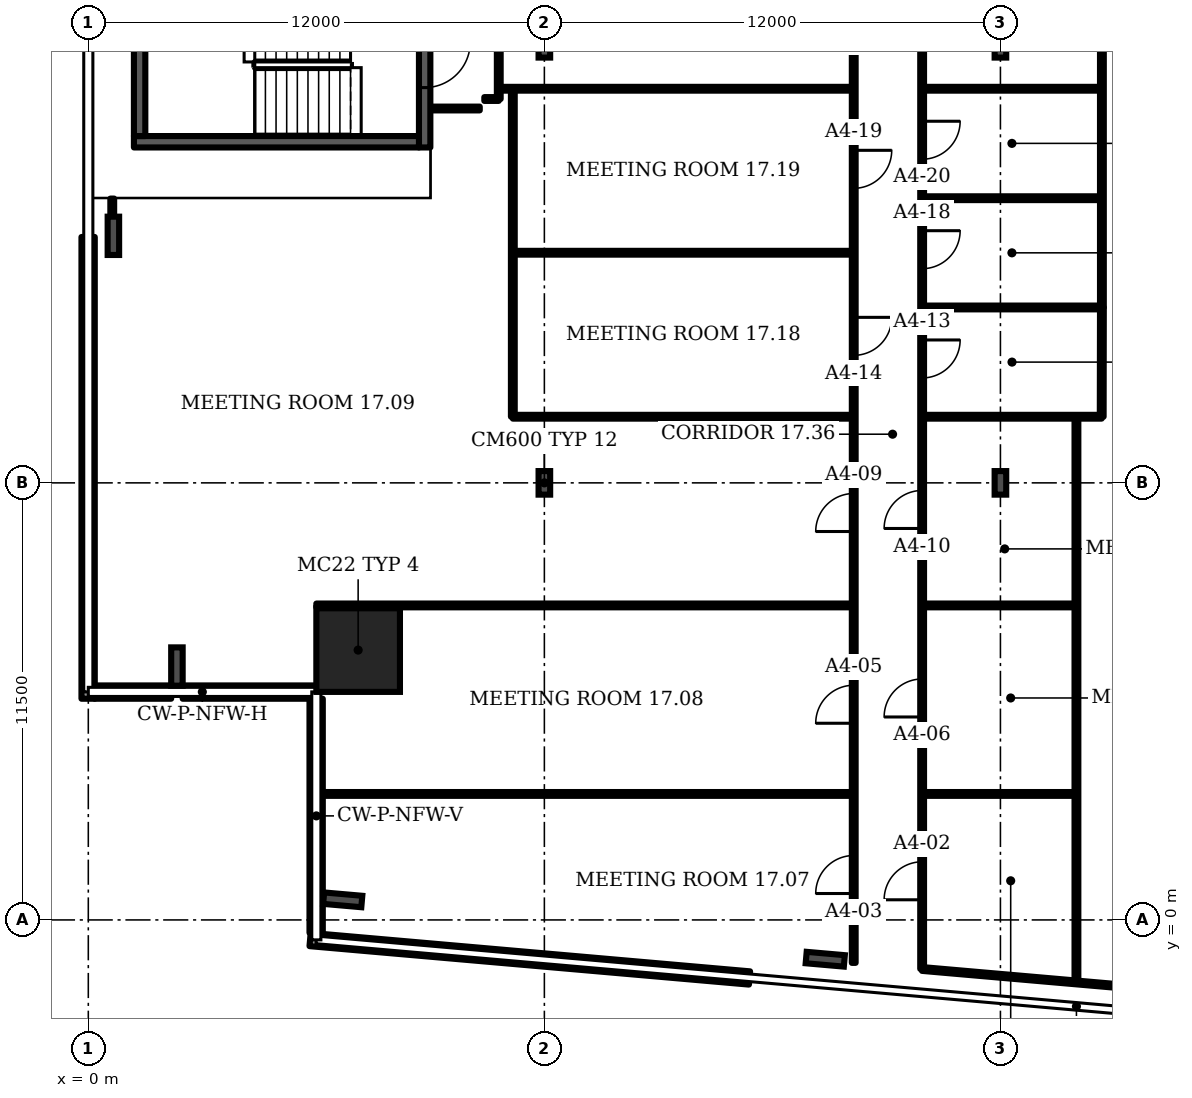
"""IFC4 building model, lengths in metres.
Left out: names, types, materials, properties, quantities, classifications, styles, units other than length and angle.
Written with IfcOpenShell. Run it as: python <this file> out.ifc"""

import sys

from ifc_helpers import new_model, si_unit, direction, frame, frame_2d, origin, origin_2d, place, context, subcontext, project, spatial, rectangle, i_section, extrude, element, fill, save


model = new_model("IFC4")
c1 = context("Model", 3, precision=1e-05, world=origin(), true_north=direction((0.0, 1.0)))
c2 = subcontext(c1, "Body", "Model", "MODEL_VIEW")
j1 = project(units=[si_unit("LENGTHUNIT", "METRE"), si_unit("PLANEANGLEUNIT", "RADIAN")], contexts=[c1])
p1 = place(None, origin())
s1 = spatial("IfcSite", under=j1, at=p1, CompositionType="ELEMENT")
p2 = place(p1, origin())
s2 = spatial("IfcBuilding", under=s1, at=p2, CompositionType="ELEMENT")
p3 = place(p2, frame((0.0, 0.0, 81.1)))
s3 = spatial("IfcBuildingStorey", under=s2, at=p3, CompositionType="ELEMENT", Elevation=81.1)
p4 = place(p3, frame((7.1, 7.1, 0.0), z_axis=(0.0, 0.0, 1.0), x_axis=(1.0, 0.0, 0.0)))
e1 = element("IfcColumn", 1, at=p4, inside=s3, PredefinedType="COLUMN", context=c2, shape_type="SweptSolid", body=[
    extrude(rectangle(XDim=2.2, YDim=2.2, at=origin_2d()), origin(), (0.0, 0.0, 1.0), 3.6),
])
for number, where, z_axis, x_axis in (
    (2, (6.694, 0.529, 0.0), (0.0, 0.0, 1.0), (-0.087, -0.996, 0.0)),
    (3, (19.391, -1.034, 0.0), (0.0, 0.0, 1.0), (-0.087, -0.996, 0.0)),
    (4, (0.66, 18.0, 0.0), (0.0, 0.0, 1.0), (-1.0, 0.0, 0.0)),
    (5, (2.332, 6.667, 0.0), (0.0, 0.0, 1.0), (-1.0, 0.0, 0.0)),
):
    element("IfcColumn", number, at=place(p3, frame(where, z_axis=z_axis, x_axis=x_axis)), inside=s3, PredefinedType="COLUMN", context=c2, shape_type="SweptSolid", body=[
        extrude(i_section(OverallWidth=0.302, OverallDepth=1.008, WebThickness=0.021, FlangeThickness=0.04, FilletRadius=0.03, at=origin_2d()), origin(), (0.0, 0.0, 1.0), 3.6),
    ])
for number, where, z_axis, x_axis in (
    (6, (12.0, 11.5, 0.0), (0.0, 0.0, 1.0), (1.0, 0.0, 0.0)),
    (7, (24.0, 11.5, 0.0), (0.0, 0.0, 1.0), (1.0, 0.0, 0.0)),
    (8, (12.0, 23.0, 0.0), (0.0, 0.0, 1.0), (1.0, 0.0, 0.0)),
    (9, (24.0, 23.0, 0.0), (0.0, 0.0, 1.0), (1.0, 0.0, 0.0)),
):
    element("IfcColumn", number, at=place(p3, frame(where, z_axis=z_axis, x_axis=x_axis)), inside=s3, PredefinedType="COLUMN", context=c2, shape_type="SweptSolid", body=[
        extrude(i_section(OverallWidth=0.305, OverallDepth=0.62, WebThickness=0.021, FlangeThickness=0.04, FilletRadius=0.027, at=origin_2d()), origin(), (0.0, 0.0, 1.0), 3.6),
    ])
p5 = place(p3, frame((5.835, -0.516, 0.0), z_axis=(0.0, 0.0, 1.0), x_axis=(0.996192, -0.087142, 0.0)))
e10 = element("IfcWall", 10, at=p5, inside=s3, PredefinedType="SOLIDWALL", context=c2, shape_type="SweptSolid", body=[
    extrude(rectangle(XDim=11.607, YDim=0.35, at=frame_2d((5.804, 0.0))), origin(), (0.0, 0.0, 1.0), 1.0),
])
p6 = place(p3, frame((-0.005, 17.97, 0.0), z_axis=(0.0, 0.0, 1.0), x_axis=(0.0, -1.0, 0.0)))
e11 = element("IfcWall", 11, at=p6, inside=s3, PredefinedType="SOLIDWALL", context=c2, shape_type="SweptSolid", body=[
    extrude(rectangle(XDim=12.15, YDim=0.35, at=frame_2d((6.075, 0.0))), origin(), (0.0, 0.0, 1.0), 1.0),
])
p7 = place(p3, frame((0.17, 5.995, 0.0), z_axis=(0.0, 0.0, 1.0), x_axis=(1.0, 0.0, 0.0)))
e12 = element("IfcWall", 12, at=p7, inside=s3, PredefinedType="SOLIDWALL", context=c2, shape_type="SweptSolid", body=[
    extrude(rectangle(XDim=2.011, YDim=0.35, at=frame_2d((1.005, 0.0))), origin(), (0.0, 0.0, 1.0), 1.0),
])
p8 = place(p3, frame((2.483, 5.995, 0.0), z_axis=(0.0, 0.0, 1.0), x_axis=(1.0, 0.0, 0.0)))
e13 = element("IfcWall", 13, at=p8, inside=s3, PredefinedType="SOLIDWALL", context=c2, shape_type="SweptSolid", body=[
    extrude(rectangle(XDim=3.517, YDim=0.35, at=frame_2d((1.759, 0.0))), origin(), (0.0, 0.0, 1.0), 1.0),
])
p9 = place(p3, frame((5.995, 5.82, 0.0), z_axis=(0.0, 0.0, 1.0), x_axis=(0.0, -1.0, 0.0)))
e14 = element("IfcWall", 14, at=p9, inside=s3, PredefinedType="SOLIDWALL", context=c2, shape_type="SweptSolid", body=[
    extrude(rectangle(XDim=6.161, YDim=0.35, at=frame_2d((3.081, 0.0))), origin(), (0.0, 0.0, 1.0), 1.0),
])
p10 = place(p3, frame((8.85, 20.325, 0.0), z_axis=(0.0, 0.0, 1.0), x_axis=(0.0, 1.0, 0.0)))
e15 = element("IfcWall", 15, at=p10, inside=s3, PredefinedType="SHEAR", context=c2, shape_type="SweptSolid", body=[
    extrude(rectangle(XDim=4.35, YDim=0.3, at=frame_2d((2.175, 0.0))), origin(), (0.0, 0.0, 1.0), 3.2),
])
p11 = place(p10, frame((1.575, 0.0, 0.0)))
e16 = element("IfcOpeningElement", 16, at=p11, cuts=e15, PredefinedType="OPENING", context=c2, shape_type="SweptSolid", body=[
    extrude(rectangle(XDim=1.2, YDim=2.1, at=frame_2d((0.6, 1.05))), frame((0.0, 0.16, 0.0), z_axis=(0.0, -1.0, 0.0), x_axis=(1.0, 0.0, 0.0)), (0.0, 0.0, 1.0), 0.32),
])
p12 = place(p3, frame((0.63, 17.5, 0.0), z_axis=(0.0, 0.0, 1.0), x_axis=(0.0, 1.0, 0.0)))
e17 = element("IfcWall", 17, at=p12, inside=s3, PredefinedType="PARTITIONING", context=c2, shape_type="SweptSolid", body=[
    extrude(rectangle(XDim=1.48, YDim=0.1, at=frame_2d((0.74, 0.0))), origin(), (0.0, 0.0, 1.0), 2.58),
])
p13 = place(p3, frame((6.0, 8.275, 0.0), z_axis=(0.0, 0.0, 1.0), x_axis=(1.0, 0.0, 0.0)))
e18 = element("IfcWall", 18, at=p13, inside=s3, PredefinedType="PARTITIONING", context=c2, shape_type="SweptSolid", body=[
    extrude(rectangle(XDim=14.14, YDim=0.1, at=frame_2d((7.07, 0.0))), origin(), (0.0, 0.0, 1.0), 3.2),
])
p14 = place(p3, frame((6.02, 3.315, 0.0), z_axis=(0.0, 0.0, 1.0), x_axis=(1.0, 0.0, 0.0)))
e19 = element("IfcWall", 19, at=p14, inside=s3, PredefinedType="PARTITIONING", context=c2, shape_type="SweptSolid", body=[
    extrude(rectangle(XDim=14.12, YDim=0.1, at=frame_2d((7.06, 0.0))), origin(), (0.0, 0.0, 1.0), 3.2),
])
p15 = place(p3, frame((9.02, 21.35, 0.0), z_axis=(0.0, 0.0, 1.0), x_axis=(1.0, 0.0, 0.0)))
e20 = element("IfcWall", 20, at=p15, inside=s3, PredefinedType="PARTITIONING", context=c2, shape_type="SweptSolid", body=[
    extrude(rectangle(XDim=1.28, YDim=0.1, at=frame_2d((0.64, 0.0))), origin(), (0.0, 0.0, 1.0), 3.2),
])
p16 = place(p3, frame((10.42, 21.6, 0.0), z_axis=(0.0, 0.0, 1.0), x_axis=(1.0, 0.0, 0.0)))
e21 = element("IfcWall", 21, at=p16, inside=s3, PredefinedType="PARTITIONING", context=c2, shape_type="SweptSolid", body=[
    extrude(rectangle(XDim=0.38, YDim=0.1, at=frame_2d((0.19, 0.0))), origin(), (0.0, 0.0, 1.0), 3.2),
])
p17 = place(p3, frame((10.8, 21.6, 0.0), z_axis=(0.0, 0.0, 1.0), x_axis=(0.0, 1.0, 0.0)))
e22 = element("IfcWall", 22, at=p17, inside=s3, PredefinedType="PARTITIONING", context=c2, shape_type="SweptSolid", body=[
    extrude(rectangle(XDim=8.9, YDim=0.1, at=frame_2d((4.45, 0.0))), origin(), (0.0, 0.0, 1.0), 3.2),
])
p18 = place(p3, frame((10.8, 21.87, 0.0), z_axis=(0.0, 0.0, 1.0), x_axis=(1.0, 0.0, 0.0)))
e23 = element("IfcWall", 23, at=p18, inside=s3, PredefinedType="PARTITIONING", context=c2, shape_type="SweptSolid", body=[
    extrude(rectangle(XDim=9.34, YDim=0.1, at=frame_2d((4.67, 0.0))), origin(), (0.0, 0.0, 1.0), 3.2),
])
p19 = place(p3, frame((11.17, 13.24, 0.0), z_axis=(0.0, 0.0, 1.0), x_axis=(0.0, 1.0, 0.0)))
e24 = element("IfcWall", 24, at=p19, inside=s3, PredefinedType="PARTITIONING", context=c2, shape_type="SweptSolid", body=[
    extrude(rectangle(XDim=8.63, YDim=0.1, at=frame_2d((4.315, 0.0))), origin(), (0.0, 0.0, 1.0), 3.2),
])
for number, where, z_axis, x_axis in (
    (25, (11.17, 13.24, 0.0), (0.0, 0.0, 1.0), (1.0, 0.0, 0.0)),
    (26, (11.17, 17.555, 0.0), (0.0, 0.0, 1.0), (1.0, 0.0, 0.0)),
):
    element("IfcWall", number, at=place(p3, frame(where, z_axis=z_axis, x_axis=x_axis)), inside=s3, PredefinedType="PARTITIONING", context=c2, shape_type="SweptSolid", body=[
        extrude(rectangle(XDim=8.97, YDim=0.1, at=frame_2d((4.485, 0.0))), origin(), (0.0, 0.0, 1.0), 3.2),
    ])
p20 = place(p3, frame((20.14, -1.13, 0.0), z_axis=(0.0, 0.0, 1.0), x_axis=(0.0, 1.0, 0.0)))
e27 = element("IfcWall", 27, at=p20, inside=s3, PredefinedType="PARTITIONING", context=c2, shape_type="SweptSolid", body=[
    extrude(rectangle(XDim=31.63, YDim=0.1, at=frame_2d((15.815, 0.0))), origin(), (0.0, 0.0, 1.0), 3.2),
])
p21 = place(p20, frame((1.825, 0.0, 0.0)))
e28 = element("IfcOpeningElement", 28, at=p21, cuts=e27, PredefinedType="OPENING", context=c2, shape_type="SweptSolid", body=[
    extrude(rectangle(XDim=1.0, YDim=2.1, at=frame_2d((0.5, 1.05))), frame((0.0, 0.06, 0.0), z_axis=(0.0, -1.0, 0.0), x_axis=(1.0, 0.0, 0.0)), (0.0, 0.0, 1.0), 0.12),
])
p22 = place(p20, frame((6.305, 0.0, 0.0)))
e29 = element("IfcOpeningElement", 29, at=p22, cuts=e27, PredefinedType="OPENING", context=c2, shape_type="SweptSolid", body=[
    extrude(rectangle(XDim=1.0, YDim=2.1, at=frame_2d((0.5, 1.05))), frame((0.0, 0.06, 0.0), z_axis=(0.0, -1.0, 0.0), x_axis=(1.0, 0.0, 0.0)), (0.0, 0.0, 1.0), 0.12),
])
p23 = place(p20, frame((11.35, 0.0, 0.0)))
e30 = element("IfcOpeningElement", 30, at=p23, cuts=e27, PredefinedType="OPENING", context=c2, shape_type="SweptSolid", body=[
    extrude(rectangle(XDim=1.0, YDim=2.1, at=frame_2d((0.5, 1.05))), frame((0.0, 0.06, 0.0), z_axis=(0.0, -1.0, 0.0), x_axis=(1.0, 0.0, 0.0)), (0.0, 0.0, 1.0), 0.12),
])
p24 = place(p20, frame((15.985, 0.0, 0.0)))
e31 = element("IfcOpeningElement", 31, at=p24, cuts=e27, PredefinedType="OPENING", context=c2, shape_type="SweptSolid", body=[
    extrude(rectangle(XDim=1.0, YDim=2.1, at=frame_2d((0.5, 1.05))), frame((0.0, 0.06, 0.0), z_axis=(0.0, -1.0, 0.0), x_axis=(1.0, 0.0, 0.0)), (0.0, 0.0, 1.0), 0.12),
])
p25 = place(p20, frame((20.38, 0.0, 0.0)))
e32 = element("IfcOpeningElement", 32, at=p25, cuts=e27, PredefinedType="OPENING", context=c2, shape_type="SweptSolid", body=[
    extrude(rectangle(XDim=1.0, YDim=2.1, at=frame_2d((0.5, 1.05))), frame((0.0, 0.06, 0.0), z_axis=(0.0, -1.0, 0.0), x_axis=(1.0, 0.0, 0.0)), (0.0, 0.0, 1.0), 0.12),
])
p26 = place(p20, frame((24.695, 0.0, 0.0)))
e33 = element("IfcOpeningElement", 33, at=p26, cuts=e27, PredefinedType="OPENING", context=c2, shape_type="SweptSolid", body=[
    extrude(rectangle(XDim=1.0, YDim=2.1, at=frame_2d((0.5, 1.05))), frame((0.0, 0.06, 0.0), z_axis=(0.0, -1.0, 0.0), x_axis=(1.0, 0.0, 0.0)), (0.0, 0.0, 1.0), 0.12),
])
p27 = place(p3, frame((21.94, -1.29, 0.0), z_axis=(0.0, 0.0, 1.0), x_axis=(0.0, 1.0, 0.0)))
e34 = element("IfcWall", 34, at=p27, inside=s3, PredefinedType="PARTITIONING", context=c2, shape_type="SweptSolid", body=[
    extrude(rectangle(XDim=31.79, YDim=0.1, at=frame_2d((15.895, 0.0))), origin(), (0.0, 0.0, 1.0), 3.2),
])
p28 = place(p27, frame((1.82, 0.0, 0.0)))
e35 = element("IfcOpeningElement", 35, at=p28, cuts=e34, PredefinedType="OPENING", context=c2, shape_type="SweptSolid", body=[
    extrude(rectangle(XDim=1.0, YDim=2.1, at=frame_2d((0.5, 1.05))), frame((0.0, 0.06, 0.0), z_axis=(0.0, -1.0, 0.0), x_axis=(1.0, 0.0, 0.0)), (0.0, 0.0, 1.0), 0.12),
])
p29 = place(p27, frame((6.63, 0.0, 0.0)))
e36 = element("IfcOpeningElement", 36, at=p29, cuts=e34, PredefinedType="OPENING", context=c2, shape_type="SweptSolid", body=[
    extrude(rectangle(XDim=1.0, YDim=2.1, at=frame_2d((0.5, 1.05))), frame((0.0, 0.06, 0.0), z_axis=(0.0, -1.0, 0.0), x_axis=(1.0, 0.0, 0.0)), (0.0, 0.0, 1.0), 0.12),
])
p30 = place(p27, frame((11.59, 0.0, 0.0)))
e37 = element("IfcOpeningElement", 37, at=p30, cuts=e34, PredefinedType="OPENING", context=c2, shape_type="SweptSolid", body=[
    extrude(rectangle(XDim=1.0, YDim=2.1, at=frame_2d((0.5, 1.05))), frame((0.0, 0.06, 0.0), z_axis=(0.0, -1.0, 0.0), x_axis=(1.0, 0.0, 0.0)), (0.0, 0.0, 1.0), 0.12),
])
p31 = place(p27, frame((15.55, 0.0, 0.0)))
e38 = element("IfcOpeningElement", 38, at=p31, cuts=e34, PredefinedType="OPENING", context=c2, shape_type="SweptSolid", body=[
    extrude(rectangle(XDim=1.0, YDim=2.1, at=frame_2d((0.5, 1.05))), frame((0.0, 0.06, 0.0), z_axis=(0.0, -1.0, 0.0), x_axis=(1.0, 0.0, 0.0)), (0.0, 0.0, 1.0), 0.12),
])
p32 = place(p27, frame((18.425, 0.0, 0.0)))
e39 = element("IfcOpeningElement", 39, at=p32, cuts=e34, PredefinedType="OPENING", context=c2, shape_type="SweptSolid", body=[
    extrude(rectangle(XDim=1.0, YDim=2.1, at=frame_2d((0.5, 1.05))), frame((0.0, 0.06, 0.0), z_axis=(0.0, -1.0, 0.0), x_axis=(1.0, 0.0, 0.0)), (0.0, 0.0, 1.0), 0.12),
])
p33 = place(p27, frame((21.305, 0.0, 0.0)))
e40 = element("IfcOpeningElement", 40, at=p33, cuts=e34, PredefinedType="OPENING", context=c2, shape_type="SweptSolid", body=[
    extrude(rectangle(XDim=1.0, YDim=2.1, at=frame_2d((0.5, 1.05))), frame((0.0, 0.06, 0.0), z_axis=(0.0, -1.0, 0.0), x_axis=(1.0, 0.0, 0.0)), (0.0, 0.0, 1.0), 0.12),
])
p34 = place(p27, frame((24.18, 0.0, 0.0)))
e41 = element("IfcOpeningElement", 41, at=p34, cuts=e34, PredefinedType="OPENING", context=c2, shape_type="SweptSolid", body=[
    extrude(rectangle(XDim=1.0, YDim=2.1, at=frame_2d((0.5, 1.05))), frame((0.0, 0.06, 0.0), z_axis=(0.0, -1.0, 0.0), x_axis=(1.0, 0.0, 0.0)), (0.0, 0.0, 1.0), 0.12),
])
p35 = place(p27, frame((27.055, 0.0, 0.0)))
e42 = element("IfcOpeningElement", 42, at=p35, cuts=e34, PredefinedType="OPENING", context=c2, shape_type="SweptSolid", body=[
    extrude(rectangle(XDim=1.0, YDim=2.1, at=frame_2d((0.5, 1.05))), frame((0.0, 0.06, 0.0), z_axis=(0.0, -1.0, 0.0), x_axis=(1.0, 0.0, 0.0)), (0.0, 0.0, 1.0), 0.12),
])
for number, where, z_axis, x_axis in (
    (43, (21.94, 3.315, 0.0), (0.0, 0.0, 1.0), (1.0, 0.0, 0.0)),
    (44, (21.94, 8.275, 0.0), (0.0, 0.0, 1.0), (1.0, 0.0, 0.0)),
):
    element("IfcWall", number, at=place(p3, frame(where, z_axis=z_axis, x_axis=x_axis)), inside=s3, PredefinedType="PARTITIONING", context=c2, shape_type="SweptSolid", body=[
        extrude(rectangle(XDim=4.06, YDim=0.1, at=frame_2d((2.03, 0.0))), origin(), (0.0, 0.0, 1.0), 3.2),
    ])
for number, where, z_axis, x_axis in (
    (45, (21.94, 13.24, 0.0), (0.0, 0.0, 1.0), (1.0, 0.0, 0.0)),
    (46, (21.94, 16.115, 0.0), (0.0, 0.0, 1.0), (1.0, 0.0, 0.0)),
    (47, (21.94, 18.99, 0.0), (0.0, 0.0, 1.0), (1.0, 0.0, 0.0)),
    (48, (21.94, 21.87, 0.0), (0.0, 0.0, 1.0), (1.0, 0.0, 0.0)),
):
    element("IfcWall", number, at=place(p3, frame(where, z_axis=z_axis, x_axis=x_axis)), inside=s3, PredefinedType="PARTITIONING", context=c2, shape_type="SweptSolid", body=[
        extrude(rectangle(XDim=4.725, YDim=0.1, at=frame_2d((2.363, 0.0))), origin(), (0.0, 0.0, 1.0), 3.2),
    ])
p36 = place(p3, frame((26.0, -1.645, 0.0), z_axis=(0.0, 0.0, 1.0), x_axis=(0.0, 1.0, 0.0)))
e49 = element("IfcWall", 49, at=p36, inside=s3, PredefinedType="PARTITIONING", context=c2, shape_type="SweptSolid", body=[
    extrude(rectangle(XDim=14.885, YDim=0.1, at=frame_2d((7.442, 0.0))), origin(), (0.0, 0.0, 1.0), 3.2),
])
p37 = place(p3, frame((26.665, 13.24, 0.0), z_axis=(0.0, 0.0, 1.0), x_axis=(0.001698, 0.999995, 0.0)))
e50 = element("IfcWall", 50, at=p37, inside=s3, PredefinedType="PARTITIONING", context=c2, shape_type="SweptSolid", body=[
    extrude(rectangle(XDim=2.875, YDim=0.1, at=frame_2d((1.438, 0.0))), origin(), (0.0, 0.0, 1.0), 3.2),
])
p38 = place(p3, frame((26.67, 16.115, 0.0), z_axis=(0.0, 0.0, 1.0), x_axis=(0.0, 1.0, 0.0)))
e51 = element("IfcWall", 51, at=p38, inside=s3, PredefinedType="PARTITIONING", context=c2, shape_type="SweptSolid", body=[
    extrude(rectangle(XDim=14.385, YDim=0.1, at=frame_2d((7.192, 0.0))), origin(), (0.0, 0.0, 1.0), 3.2),
])
p39 = place(p3, frame((33.22, -2.275, 0.0), z_axis=(0.0, 0.0, 1.0), x_axis=(-0.996212, 0.086913, 0.0)))
e52 = element("IfcWall", 52, at=p39, inside=s3, PredefinedType="PARTITIONING", context=c2, shape_type="SweptSolid", body=[
    extrude(rectangle(XDim=11.323, YDim=0.1, at=frame_2d((5.662, 0.0))), origin(), (0.0, 0.0, 1.0), 2.58),
])
p40 = place(p3, frame((1.2, 20.475, 0.0), z_axis=(0.0, 0.0, 1.0), x_axis=(1.0, 0.0, 0.0)))
e53 = element("IfcWall", 53, at=p40, inside=s3, PredefinedType="SHEAR", context=c2, shape_type="SweptSolid", body=[
    extrude(rectangle(XDim=7.5, YDim=0.3, at=frame_2d((3.75, 0.0))), origin(), (0.0, 0.0, 1.0), 3.2),
])
p41 = place(p3, frame((1.35, 20.625, 0.0), z_axis=(0.0, 0.0, 1.0), x_axis=(0.0, 1.0, 0.0)))
e54 = element("IfcWall", 54, at=p41, inside=s3, PredefinedType="SHEAR", context=c2, shape_type="SweptSolid", body=[
    extrude(rectangle(XDim=3.75, YDim=0.3, at=frame_2d((1.875, 0.0))), origin(), (0.0, 0.0, 1.0), 3.2),
])
p42 = place(p11, origin())
e55 = element("IfcDoor", 55, at=p42, inside=s3, OperationType="SINGLE_SWING_RIGHT", PredefinedType="DOOR", context=c2, shape_type="SweptSolid", body=[
    extrude(rectangle(XDim=1.2, YDim=2.1, at=frame_2d((0.6, 1.05))), frame((0.0, 0.025, 0.0), z_axis=(0.0, -1.0, 0.0), x_axis=(1.0, 0.0, 0.0)), (0.0, 0.0, 1.0), 0.05),
])
fill(e16, e55)
p43 = place(p28, origin())
e56 = element("IfcDoor", 56, at=p43, inside=s3, OperationType="SINGLE_SWING_LEFT", PredefinedType="DOOR", context=c2, shape_type="SweptSolid", body=[
    extrude(rectangle(XDim=1.0, YDim=2.1, at=frame_2d((0.5, 1.05))), frame((0.0, 0.025, 0.0), z_axis=(0.0, -1.0, 0.0), x_axis=(1.0, 0.0, 0.0)), (0.0, 0.0, 1.0), 0.05),
])
fill(e35, e56)
p44 = place(p21, origin())
e57 = element("IfcDoor", 57, at=p44, inside=s3, OperationType="SINGLE_SWING_LEFT", PredefinedType="DOOR", context=c2, shape_type="SweptSolid", body=[
    extrude(rectangle(XDim=1.0, YDim=2.1, at=frame_2d((0.5, 1.05))), frame((0.0, 0.025, 0.0), z_axis=(0.0, -1.0, 0.0), x_axis=(1.0, 0.0, 0.0)), (0.0, 0.0, 1.0), 0.05),
])
fill(e28, e57)
p45 = place(p22, origin())
e58 = element("IfcDoor", 58, at=p45, inside=s3, OperationType="SINGLE_SWING_LEFT", PredefinedType="DOOR", context=c2, shape_type="SweptSolid", body=[
    extrude(rectangle(XDim=1.0, YDim=2.1, at=frame_2d((0.5, 1.05))), frame((0.0, 0.025, 0.0), z_axis=(0.0, -1.0, 0.0), x_axis=(1.0, 0.0, 0.0)), (0.0, 0.0, 1.0), 0.05),
])
fill(e29, e58)
p46 = place(p29, origin())
e59 = element("IfcDoor", 59, at=p46, inside=s3, OperationType="SINGLE_SWING_LEFT", PredefinedType="DOOR", context=c2, shape_type="SweptSolid", body=[
    extrude(rectangle(XDim=1.0, YDim=2.1, at=frame_2d((0.5, 1.05))), frame((0.0, 0.025, 0.0), z_axis=(0.0, -1.0, 0.0), x_axis=(1.0, 0.0, 0.0)), (0.0, 0.0, 1.0), 0.05),
])
fill(e36, e59)
p47 = place(p23, origin())
e60 = element("IfcDoor", 60, at=p47, inside=s3, OperationType="SINGLE_SWING_LEFT", PredefinedType="DOOR", context=c2, shape_type="SweptSolid", body=[
    extrude(rectangle(XDim=1.0, YDim=2.1, at=frame_2d((0.5, 1.05))), frame((0.0, 0.025, 0.0), z_axis=(0.0, -1.0, 0.0), x_axis=(1.0, 0.0, 0.0)), (0.0, 0.0, 1.0), 0.05),
])
fill(e30, e60)
p48 = place(p30, origin())
e61 = element("IfcDoor", 61, at=p48, inside=s3, OperationType="SINGLE_SWING_LEFT", PredefinedType="DOOR", context=c2, shape_type="SweptSolid", body=[
    extrude(rectangle(XDim=1.0, YDim=2.1, at=frame_2d((0.5, 1.05))), frame((0.0, 0.025, 0.0), z_axis=(0.0, -1.0, 0.0), x_axis=(1.0, 0.0, 0.0)), (0.0, 0.0, 1.0), 0.05),
])
fill(e37, e61)
p49 = place(p31, origin())
e62 = element("IfcDoor", 62, at=p49, inside=s3, OperationType="SINGLE_SWING_RIGHT", PredefinedType="DOOR", context=c2, shape_type="SweptSolid", body=[
    extrude(rectangle(XDim=1.0, YDim=2.1, at=frame_2d((0.5, 1.05))), frame((0.0, 0.025, 0.0), z_axis=(0.0, -1.0, 0.0), x_axis=(1.0, 0.0, 0.0)), (0.0, 0.0, 1.0), 0.05),
])
fill(e38, e62)
p50 = place(p24, origin())
e63 = element("IfcDoor", 63, at=p50, inside=s3, OperationType="SINGLE_SWING_RIGHT", PredefinedType="DOOR", context=c2, shape_type="SweptSolid", body=[
    extrude(rectangle(XDim=1.0, YDim=2.1, at=frame_2d((0.5, 1.05))), frame((0.0, 0.025, 0.0), z_axis=(0.0, -1.0, 0.0), x_axis=(1.0, 0.0, 0.0)), (0.0, 0.0, 1.0), 0.05),
])
fill(e31, e63)
p51 = place(p32, origin())
e64 = element("IfcDoor", 64, at=p51, inside=s3, OperationType="SINGLE_SWING_RIGHT", PredefinedType="DOOR", context=c2, shape_type="SweptSolid", body=[
    extrude(rectangle(XDim=1.0, YDim=2.1, at=frame_2d((0.5, 1.05))), frame((0.0, 0.025, 0.0), z_axis=(0.0, -1.0, 0.0), x_axis=(1.0, 0.0, 0.0)), (0.0, 0.0, 1.0), 0.05),
])
fill(e39, e64)
p52 = place(p25, origin())
e65 = element("IfcDoor", 65, at=p52, inside=s3, OperationType="SINGLE_SWING_RIGHT", PredefinedType="DOOR", context=c2, shape_type="SweptSolid", body=[
    extrude(rectangle(XDim=1.0, YDim=2.1, at=frame_2d((0.5, 1.05))), frame((0.0, 0.025, 0.0), z_axis=(0.0, -1.0, 0.0), x_axis=(1.0, 0.0, 0.0)), (0.0, 0.0, 1.0), 0.05),
])
fill(e32, e65)
p53 = place(p33, origin())
e66 = element("IfcDoor", 66, at=p53, inside=s3, OperationType="SINGLE_SWING_RIGHT", PredefinedType="DOOR", context=c2, shape_type="SweptSolid", body=[
    extrude(rectangle(XDim=1.0, YDim=2.1, at=frame_2d((0.5, 1.05))), frame((0.0, 0.025, 0.0), z_axis=(0.0, -1.0, 0.0), x_axis=(1.0, 0.0, 0.0)), (0.0, 0.0, 1.0), 0.05),
])
fill(e40, e66)
save(model, sys.argv[1])
